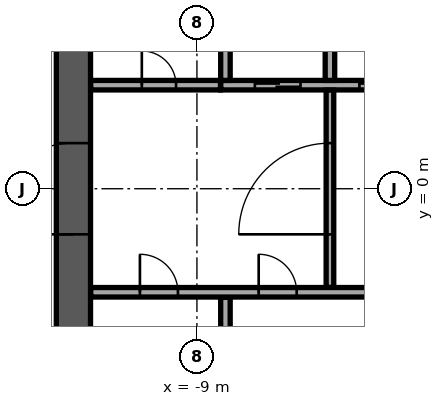
"""IFC4 building model, lengths in metres.
Left out: names, types, materials, properties, quantities, classifications, styles, units other than length and angle.
Written with IfcOpenShell. Run it as: python <this file> out.ifc"""

import sys

from ifc_helpers import new_model, si_unit, direction, frame, frame_2d, origin, place, context, subcontext, project, spatial, rectangle, extrude, element, fill, save


model = new_model("IFC4")
c1 = context("Model", 3, precision=1e-05, world=origin(), true_north=direction((0.0, 1.0)))
c2 = subcontext(c1, "Body", "Model", "MODEL_VIEW")
j1 = project(units=[si_unit("LENGTHUNIT", "METRE"), si_unit("PLANEANGLEUNIT", "RADIAN")], contexts=[c1])
p1 = place(None, origin())
s1 = spatial("IfcSite", under=j1, at=p1, CompositionType="ELEMENT")
p2 = place(p1, origin())
s2 = spatial("IfcBuilding", under=s1, at=p2, CompositionType="ELEMENT")
p3 = place(p2, frame((0.0, 0.0, 189.3)))
s3 = spatial("IfcBuildingStorey", under=s2, at=p3, CompositionType="ELEMENT", Elevation=189.3)
p4 = place(p3, frame((-12.25, -11.8, 0.0), z_axis=(0.0, 0.0, 1.0), x_axis=(0.0, 1.0, 0.0)))
e1 = element("IfcWall", 1, at=p4, inside=s3, PredefinedType="SHEAR", context=c2, shape_type="SweptSolid", body=[
    extrude(rectangle(XDim=23.6, YDim=0.9, at=frame_2d((11.8, 0.0))), origin(), (0.0, 0.0, 1.0), 3.62),
])
p5 = place(p4, frame((10.6, 0.0, 0.0)))
e2 = element("IfcOpeningElement", 2, at=p5, cuts=e1, PredefinedType="OPENING", context=c2, shape_type="SweptSolid", body=[
    extrude(rectangle(XDim=2.4, YDim=2.4, at=frame_2d((1.2, 1.2))), frame((0.0, 0.46, 0.0), z_axis=(0.0, -1.0, 0.0), x_axis=(1.0, 0.0, 0.0)), (0.0, 0.0, 1.0), 0.92),
])
p6 = place(p3, frame((-8.375, 2.725, 0.0), z_axis=(0.0, 0.0, 1.0), x_axis=(1.0, 0.0, 0.0)))
e3 = element("IfcWall", 3, at=p6, inside=s3, PredefinedType="SOLIDWALL", context=c2, shape_type="SweptSolid", body=[
    extrude(rectangle(XDim=16.75, YDim=0.25, at=frame_2d((8.375, 0.0))), origin(), (0.0, 0.0, 1.0), 3.62),
])
p7 = place(p6, frame((0.9, 0.0, 0.0)))
e4 = element("IfcOpeningElement", 4, at=p7, cuts=e3, PredefinedType="OPENING", context=c2, shape_type="SweptSolid", body=[
    extrude(rectangle(XDim=1.2, YDim=2.1, at=frame_2d((0.6, 1.05))), frame((0.0, 0.135, 0.0), z_axis=(0.0, -1.0, 0.0), x_axis=(1.0, 0.0, 0.0)), (0.0, 0.0, 1.0), 0.27),
])
p8 = place(p6, frame((3.65, 0.0, 0.0)))
e5 = element("IfcOpeningElement", 5, at=p8, cuts=e3, PredefinedType="OPENING", context=c2, shape_type="SweptSolid", body=[
    extrude(rectangle(XDim=1.2, YDim=2.1, at=frame_2d((0.6, 1.05))), frame((0.0, 0.135, 0.0), z_axis=(0.0, -1.0, 0.0), x_axis=(1.0, 0.0, 0.0)), (0.0, 0.0, 1.0), 0.27),
])
p9 = place(p6, frame((6.4, 0.0, 0.0)))
e6 = element("IfcOpeningElement", 6, at=p9, cuts=e3, PredefinedType="OPENING", context=c2, shape_type="SweptSolid", body=[
    extrude(rectangle(XDim=1.2, YDim=2.1, at=frame_2d((0.6, 1.05))), frame((0.0, 0.135, 0.0), z_axis=(0.0, -1.0, 0.0), x_axis=(1.0, 0.0, 0.0)), (0.0, 0.0, 1.0), 0.27),
])
p10 = place(p6, frame((9.15, 0.0, 0.0)))
e7 = element("IfcOpeningElement", 7, at=p10, cuts=e3, PredefinedType="OPENING", context=c2, shape_type="SweptSolid", body=[
    extrude(rectangle(XDim=1.2, YDim=2.1, at=frame_2d((0.6, 1.05))), frame((0.0, 0.135, 0.0), z_axis=(0.0, -1.0, 0.0), x_axis=(1.0, 0.0, 0.0)), (0.0, 0.0, 1.0), 0.27),
])
p11 = place(p6, frame((11.9, 0.0, 0.0)))
e8 = element("IfcOpeningElement", 8, at=p11, cuts=e3, PredefinedType="OPENING", context=c2, shape_type="SweptSolid", body=[
    extrude(rectangle(XDim=1.2, YDim=2.1, at=frame_2d((0.6, 1.05))), frame((0.0, 0.135, 0.0), z_axis=(0.0, -1.0, 0.0), x_axis=(1.0, 0.0, 0.0)), (0.0, 0.0, 1.0), 0.27),
])
p12 = place(p6, frame((14.65, 0.0, 0.0)))
e9 = element("IfcOpeningElement", 9, at=p12, cuts=e3, PredefinedType="OPENING", context=c2, shape_type="SweptSolid", body=[
    extrude(rectangle(XDim=1.2, YDim=2.1, at=frame_2d((0.6, 1.05))), frame((0.0, 0.135, 0.0), z_axis=(0.0, -1.0, 0.0), x_axis=(1.0, 0.0, 0.0)), (0.0, 0.0, 1.0), 0.27),
])
for number, where, z_axis, x_axis in (
    (10, (-8.25, 2.85, 0.0), (0.0, 0.0, 1.0), (0.0, 1.0, 0.0)),
    (11, (-5.5, 2.85, 0.0), (0.0, 0.0, 1.0), (0.0, 1.0, 0.0)),
):
    element("IfcWall", number, at=place(p3, frame(where, z_axis=z_axis, x_axis=x_axis)), inside=s3, PredefinedType="SOLIDWALL", context=c2, shape_type="SweptSolid", body=[
        extrude(rectangle(XDim=2.7, YDim=0.25, at=frame_2d((1.35, 0.0))), origin(), (0.0, 0.0, 1.0), 3.62),
    ])
p13 = place(p3, frame((-8.25, -5.545, 0.0), z_axis=(0.0, 0.0, 1.0), x_axis=(0.0, 1.0, 0.0)))
e12 = element("IfcWall", 12, at=p13, inside=s3, PredefinedType="PARTITIONING", context=c2, shape_type="SweptSolid", body=[
    extrude(rectangle(XDim=2.69, YDim=0.25, at=frame_2d((1.345, 0.0))), origin(), (0.0, 0.0, 1.0), 3.62),
])
p14 = place(p3, frame((-11.795, -2.725, 0.0), z_axis=(0.0, 0.0, 1.0), x_axis=(1.0, 0.0, 0.0)))
e13 = element("IfcWall", 13, at=p14, inside=s3, PredefinedType="PARTITIONING", context=c2, shape_type="SweptSolid", body=[
    extrude(rectangle(XDim=8.915, YDim=0.25, at=frame_2d((4.458, 0.0))), origin(), (0.0, 0.0, 1.0), 3.62),
])
p15 = place(p14, frame((1.295, 0.0, 0.0)))
e14 = element("IfcOpeningElement", 14, at=p15, cuts=e13, PredefinedType="OPENING", context=c2, shape_type="SweptSolid", body=[
    extrude(rectangle(XDim=1.0, YDim=2.1, at=frame_2d((0.5, 1.05))), frame((0.0, 0.135, 0.0), z_axis=(0.0, -1.0, 0.0), x_axis=(1.0, 0.0, 0.0)), (0.0, 0.0, 1.0), 0.27),
])
p16 = place(p14, frame((4.42, 0.0, 0.0)))
e15 = element("IfcOpeningElement", 15, at=p16, cuts=e13, PredefinedType="OPENING", context=c2, shape_type="SweptSolid", body=[
    extrude(rectangle(XDim=1.0, YDim=2.1, at=frame_2d((0.5, 1.05))), frame((0.0, 0.135, 0.0), z_axis=(0.0, -1.0, 0.0), x_axis=(1.0, 0.0, 0.0)), (0.0, 0.0, 1.0), 0.27),
])
p17 = place(p3, frame((-5.5, -2.595, 0.0), z_axis=(0.0, 0.0, 1.0), x_axis=(0.0, 1.0, 0.0)))
e16 = element("IfcWall", 16, at=p17, inside=s3, PredefinedType="PARTITIONING", context=c2, shape_type="SweptSolid", body=[
    extrude(rectangle(XDim=5.19, YDim=0.2, at=frame_2d((2.595, 0.0))), origin(), (0.0, 0.0, 1.0), 3.62),
])
p18 = place(p17, frame((1.395, 0.0, 0.0)))
e17 = element("IfcOpeningElement", 17, at=p18, cuts=e16, PredefinedType="OPENING", context=c2, shape_type="SweptSolid", body=[
    extrude(rectangle(XDim=2.4, YDim=2.4, at=frame_2d((1.2, 1.2))), frame((0.0, 0.11, 0.0), z_axis=(0.0, -1.0, 0.0), x_axis=(1.0, 0.0, 0.0)), (0.0, 0.0, 1.0), 0.22),
])
p19 = place(p3, frame((-11.795, 2.725, 0.0), z_axis=(0.0, 0.0, 1.0), x_axis=(1.0, 0.0, 0.0)))
e18 = element("IfcWall", 18, at=p19, inside=s3, PredefinedType="PARTITIONING", context=c2, shape_type="SweptSolid", body=[
    extrude(rectangle(XDim=3.415, YDim=0.25, at=frame_2d((1.708, 0.0))), origin(), (0.0, 0.0, 1.0), 3.62),
])
p20 = place(p19, frame((1.345, 0.0, 0.0)))
e19 = element("IfcOpeningElement", 19, at=p20, cuts=e18, PredefinedType="OPENING", context=c2, shape_type="SweptSolid", body=[
    extrude(rectangle(XDim=0.9, YDim=2.1, at=frame_2d((0.45, 1.05))), frame((0.0, 0.135, 0.0), z_axis=(0.0, -1.0, 0.0), x_axis=(1.0, 0.0, 0.0)), (0.0, 0.0, 1.0), 0.27),
])
p21 = place(p3, frame((2.286, 34.715, 0.0), z_axis=(0.0, 0.0, 1.0), x_axis=(-0.754708272811, -0.656060532993, 0.0)))
e20 = element("IfcWall", 20, at=p21, inside=s3, PredefinedType="STANDARD", context=c2, shape_type="SweptSolid", body=[
    extrude(rectangle(XDim=49.0, YDim=0.6, at=frame_2d((24.5, 0.0))), origin(), (0.0, 0.0, 1.0), 3.62),
])
p22 = place(p21, frame((1.227, 0.0, 0.9)))
e21 = element("IfcOpeningElement", 21, at=p22, cuts=e20, PredefinedType="OPENING", context=c2, shape_type="SweptSolid", body=[
    extrude(rectangle(XDim=2.0, YDim=2.1, at=frame_2d((1.0, 1.05))), frame((0.0, 0.31, 0.0), z_axis=(0.0, -1.0, 0.0), x_axis=(1.0, 0.0, 0.0)), (0.0, 0.0, 1.0), 0.62),
])
p23 = place(p21, frame((5.682, 0.0, 0.9)))
e22 = element("IfcOpeningElement", 22, at=p23, cuts=e20, PredefinedType="OPENING", context=c2, shape_type="SweptSolid", body=[
    extrude(rectangle(XDim=2.0, YDim=2.1, at=frame_2d((1.0, 1.05))), frame((0.0, 0.31, 0.0), z_axis=(0.0, -1.0, 0.0), x_axis=(1.0, 0.0, 0.0)), (0.0, 0.0, 1.0), 0.62),
])
p24 = place(p21, frame((10.136, 0.0, 0.9)))
e23 = element("IfcOpeningElement", 23, at=p24, cuts=e20, PredefinedType="OPENING", context=c2, shape_type="SweptSolid", body=[
    extrude(rectangle(XDim=2.0, YDim=2.1, at=frame_2d((1.0, 1.05))), frame((0.0, 0.31, 0.0), z_axis=(0.0, -1.0, 0.0), x_axis=(1.0, 0.0, 0.0)), (0.0, 0.0, 1.0), 0.62),
])
p25 = place(p21, frame((14.591, 0.0, 0.9)))
e24 = element("IfcOpeningElement", 24, at=p25, cuts=e20, PredefinedType="OPENING", context=c2, shape_type="SweptSolid", body=[
    extrude(rectangle(XDim=2.0, YDim=2.1, at=frame_2d((1.0, 1.05))), frame((0.0, 0.31, 0.0), z_axis=(0.0, -1.0, 0.0), x_axis=(1.0, 0.0, 0.0)), (0.0, 0.0, 1.0), 0.62),
])
p26 = place(p21, frame((19.045, 0.0, 0.9)))
e25 = element("IfcOpeningElement", 25, at=p26, cuts=e20, PredefinedType="OPENING", context=c2, shape_type="SweptSolid", body=[
    extrude(rectangle(XDim=2.0, YDim=2.1, at=frame_2d((1.0, 1.05))), frame((0.0, 0.31, 0.0), z_axis=(0.0, -1.0, 0.0), x_axis=(1.0, 0.0, 0.0)), (0.0, 0.0, 1.0), 0.62),
])
p27 = place(p21, frame((23.5, 0.0, 0.9)))
e26 = element("IfcOpeningElement", 26, at=p27, cuts=e20, PredefinedType="OPENING", context=c2, shape_type="SweptSolid", body=[
    extrude(rectangle(XDim=2.0, YDim=2.1, at=frame_2d((1.0, 1.05))), frame((0.0, 0.31, 0.0), z_axis=(0.0, -1.0, 0.0), x_axis=(1.0, 0.0, 0.0)), (0.0, 0.0, 1.0), 0.62),
])
p28 = place(p21, frame((27.955, 0.0, 0.9)))
e27 = element("IfcOpeningElement", 27, at=p28, cuts=e20, PredefinedType="OPENING", context=c2, shape_type="SweptSolid", body=[
    extrude(rectangle(XDim=2.0, YDim=2.1, at=frame_2d((1.0, 1.05))), frame((0.0, 0.31, 0.0), z_axis=(0.0, -1.0, 0.0), x_axis=(1.0, 0.0, 0.0)), (0.0, 0.0, 1.0), 0.62),
])
p29 = place(p21, frame((32.409, 0.0, 0.9)))
e28 = element("IfcOpeningElement", 28, at=p29, cuts=e20, PredefinedType="OPENING", context=c2, shape_type="SweptSolid", body=[
    extrude(rectangle(XDim=2.0, YDim=2.1, at=frame_2d((1.0, 1.05))), frame((0.0, 0.31, 0.0), z_axis=(0.0, -1.0, 0.0), x_axis=(1.0, 0.0, 0.0)), (0.0, 0.0, 1.0), 0.62),
])
p30 = place(p21, frame((36.864, 0.0, 0.9)))
e29 = element("IfcOpeningElement", 29, at=p30, cuts=e20, PredefinedType="OPENING", context=c2, shape_type="SweptSolid", body=[
    extrude(rectangle(XDim=2.0, YDim=2.1, at=frame_2d((1.0, 1.05))), frame((0.0, 0.31, 0.0), z_axis=(0.0, -1.0, 0.0), x_axis=(1.0, 0.0, 0.0)), (0.0, 0.0, 1.0), 0.62),
])
p31 = place(p21, frame((41.318, 0.0, 0.9)))
e30 = element("IfcOpeningElement", 30, at=p31, cuts=e20, PredefinedType="OPENING", context=c2, shape_type="SweptSolid", body=[
    extrude(rectangle(XDim=2.0, YDim=2.1, at=frame_2d((1.0, 1.05))), frame((0.0, 0.31, 0.0), z_axis=(0.0, -1.0, 0.0), x_axis=(1.0, 0.0, 0.0)), (0.0, 0.0, 1.0), 0.62),
])
p32 = place(p21, frame((45.773, 0.0, 0.9)))
e31 = element("IfcOpeningElement", 31, at=p32, cuts=e20, PredefinedType="OPENING", context=c2, shape_type="SweptSolid", body=[
    extrude(rectangle(XDim=2.0, YDim=2.1, at=frame_2d((1.0, 1.05))), frame((0.0, 0.31, 0.0), z_axis=(0.0, -1.0, 0.0), x_axis=(1.0, 0.0, 0.0)), (0.0, 0.0, 1.0), 0.62),
])
p33 = place(p3, frame((-26.208, 2.616, 0.0), z_axis=(0.0, 0.0, 1.0), x_axis=(0.754710701231, 0.656057739416, 0.0)))
e32 = element("IfcWall", 32, at=p33, inside=s3, PredefinedType="PARTITIONING", context=c2, shape_type="SweptSolid", body=[
    extrude(rectangle(XDim=36.126, YDim=0.15, at=frame_2d((18.063, 0.0))), origin(), (0.0, 0.0, 1.0), 3.17),
])
p34 = place(p33, frame((2.551, 0.0, 0.0)))
e33 = element("IfcOpeningElement", 33, at=p34, cuts=e32, PredefinedType="OPENING", context=c2, shape_type="SweptSolid", body=[
    extrude(rectangle(XDim=1.0, YDim=2.1, at=frame_2d((0.5, 1.05))), frame((0.0, 0.085, 0.0), z_axis=(0.0, -1.0, 0.0), x_axis=(1.0, 0.0, 0.0)), (0.0, 0.0, 1.0), 0.17),
])
p35 = place(p33, frame((15.362, 0.0, 0.0)))
e34 = element("IfcOpeningElement", 34, at=p35, cuts=e32, PredefinedType="OPENING", context=c2, shape_type="SweptSolid", body=[
    extrude(rectangle(XDim=1.0, YDim=2.1, at=frame_2d((0.5, 1.05))), frame((0.0, 0.085, 0.0), z_axis=(0.0, -1.0, 0.0), x_axis=(1.0, 0.0, 0.0)), (0.0, 0.0, 1.0), 0.17),
])
p36 = place(p33, frame((25.542, 0.0, 0.0)))
e35 = element("IfcOpeningElement", 35, at=p36, cuts=e32, PredefinedType="OPENING", context=c2, shape_type="SweptSolid", body=[
    extrude(rectangle(XDim=1.8, YDim=2.1, at=frame_2d((0.9, 1.05))), frame((0.0, 0.085, 0.0), z_axis=(0.0, -1.0, 0.0), x_axis=(1.0, 0.0, 0.0)), (0.0, 0.0, 1.0), 0.17),
])
p37 = place(p5, origin())
e36 = element("IfcDoor", 36, at=p37, inside=s3, OperationType="SINGLE_SWING_LEFT", PredefinedType="DOOR", context=c2, shape_type="SweptSolid", body=[
    extrude(rectangle(XDim=2.4, YDim=2.4, at=frame_2d((1.2, 1.2))), frame((0.0, 0.025, 0.0), z_axis=(0.0, -1.0, 0.0), x_axis=(1.0, 0.0, 0.0)), (0.0, 0.0, 1.0), 0.05),
])
fill(e2, e36)
p38 = place(p7, origin())
e37 = element("IfcDoor", 37, at=p38, inside=s3, OperationType="DOUBLE_DOOR_SLIDING", PredefinedType="DOOR", context=c2, shape_type="SweptSolid", body=[
    extrude(rectangle(XDim=1.2, YDim=2.1, at=frame_2d((0.6, 1.05))), frame((0.0, 0.025, 0.0), z_axis=(0.0, -1.0, 0.0), x_axis=(1.0, 0.0, 0.0)), (0.0, 0.0, 1.0), 0.05),
])
fill(e4, e37)
p39 = place(p8, origin())
e38 = element("IfcDoor", 38, at=p39, inside=s3, OperationType="DOUBLE_DOOR_SLIDING", PredefinedType="DOOR", context=c2, shape_type="SweptSolid", body=[
    extrude(rectangle(XDim=1.2, YDim=2.1, at=frame_2d((0.6, 1.05))), frame((0.0, 0.025, 0.0), z_axis=(0.0, -1.0, 0.0), x_axis=(1.0, 0.0, 0.0)), (0.0, 0.0, 1.0), 0.05),
])
fill(e5, e38)
p40 = place(p15, origin())
e39 = element("IfcDoor", 39, at=p40, inside=s3, OperationType="SINGLE_SWING_LEFT", PredefinedType="DOOR", context=c2, shape_type="SweptSolid", body=[
    extrude(rectangle(XDim=1.0, YDim=2.1, at=frame_2d((0.5, 1.05))), frame((0.0, 0.025, 0.0), z_axis=(0.0, -1.0, 0.0), x_axis=(1.0, 0.0, 0.0)), (0.0, 0.0, 1.0), 0.05),
])
fill(e14, e39)
p41 = place(p20, origin())
e40 = element("IfcDoor", 40, at=p41, inside=s3, OperationType="SINGLE_SWING_LEFT", PredefinedType="DOOR", context=c2, shape_type="SweptSolid", body=[
    extrude(rectangle(XDim=0.9, YDim=2.1, at=frame_2d((0.45, 1.05))), frame((0.0, 0.025, 0.0), z_axis=(0.0, -1.0, 0.0), x_axis=(1.0, 0.0, 0.0)), (0.0, 0.0, 1.0), 0.05),
])
fill(e19, e40)
p42 = place(p16, origin())
e41 = element("IfcDoor", 41, at=p42, inside=s3, OperationType="SINGLE_SWING_LEFT", PredefinedType="DOOR", context=c2, shape_type="SweptSolid", body=[
    extrude(rectangle(XDim=1.0, YDim=2.1, at=frame_2d((0.5, 1.05))), frame((0.0, 0.025, 0.0), z_axis=(0.0, -1.0, 0.0), x_axis=(1.0, 0.0, 0.0)), (0.0, 0.0, 1.0), 0.05),
])
fill(e15, e41)
p43 = place(p18, origin())
e42 = element("IfcDoor", 42, at=p43, inside=s3, OperationType="SINGLE_SWING_LEFT", PredefinedType="DOOR", context=c2, shape_type="SweptSolid", body=[
    extrude(rectangle(XDim=2.4, YDim=2.4, at=frame_2d((1.2, 1.2))), frame((0.0, 0.025, 0.0), z_axis=(0.0, -1.0, 0.0), x_axis=(1.0, 0.0, 0.0)), (0.0, 0.0, 1.0), 0.05),
])
fill(e17, e42)
save(model, sys.argv[1])
